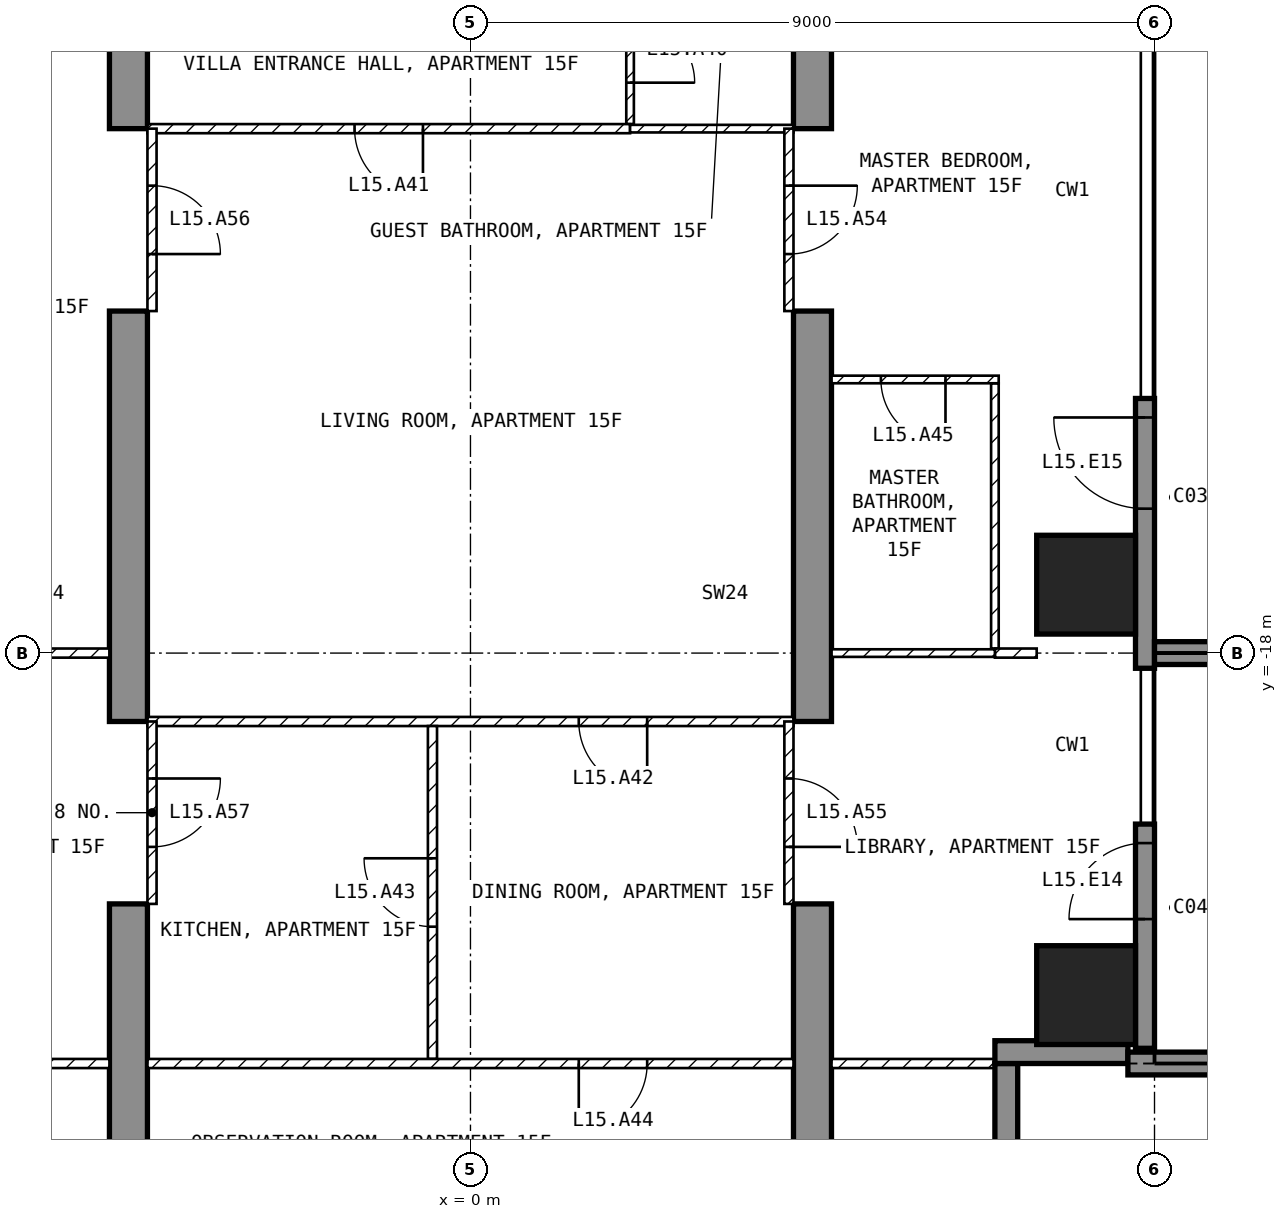
"""IFC4 building model, lengths in metres.
Left out: names, types, materials, properties, quantities, classifications, styles, units other than length and angle.
Written with IfcOpenShell. Run it as: python <this file> out.ifc"""

import sys

from ifc_helpers import new_model, si_unit, direction, frame, frame_2d, origin, origin_2d, place, context, subcontext, project, spatial, polyline, rectangle, outline, extrude, element, fill, save


model = new_model("IFC4")
c1 = context("Model", 3, precision=1e-05, world=origin(), true_north=direction((0.0, 1.0)))
c2 = subcontext(c1, "Body", "Model", "MODEL_VIEW")
j1 = project(units=[si_unit("LENGTHUNIT", "METRE"), si_unit("PLANEANGLEUNIT", "RADIAN")], contexts=[c1])
p1 = place(None, origin())
s1 = spatial("IfcSite", under=j1, at=p1, CompositionType="ELEMENT")
p2 = place(p1, origin())
s2 = spatial("IfcBuilding", under=s1, at=p2, CompositionType="ELEMENT")
p3 = place(p2, frame((0.0, 0.0, 71.5)))
s3 = spatial("IfcBuildingStorey", under=s2, at=p3, CompositionType="ELEMENT", Elevation=71.5)
for number, where, z_axis, x_axis in (
    (1, (8.1, -22.5, -0.25), (0.0, 0.0, 1.0), (1.0, 0.0, 0.0)),
    (2, (8.1, -17.1, -0.25), (0.0, 0.0, 1.0), (1.0, 0.0, 0.0)),
):
    element("IfcColumn", number, at=place(p3, frame(where, z_axis=z_axis, x_axis=x_axis)), inside=s3, PredefinedType="COLUMN", context=c2, shape_type="SweptSolid", body=[
        extrude(rectangle(XDim=1.3, YDim=1.3, at=origin_2d()), origin(), (0.0, 0.0, 1.0), 3.5),
    ])
for number, where, z_axis, x_axis in (
    (3, (-4.75, -25.45, -0.25), (1.0, 0.0, 0.0), (0.0, 1.0, 0.0)),
    (4, (4.25, -25.45, -0.25), (1.0, 0.0, 0.0), (0.0, 1.0, 0.0)),
):
    element("IfcWall", number, at=place(p3, frame(where, z_axis=z_axis, x_axis=x_axis)), inside=s3, PredefinedType="SHEAR", context=c2, shape_type="SweptSolid", body=[
        extrude(outline(polyline([(0.0, 0.0), (4.15, 0.0), (4.15, 2.65), (6.55, 2.65), (6.55, 0.0), (11.95, 0.0), (11.95, 2.65), (14.35, 2.65), (14.35, 0.0), (16.45, 0.0), (16.45, 3.5), (0.0, 3.5), (0.0, 0.0)])), origin(), (0.0, 0.0, 1.0), 0.5),
    ])
p4 = place(p3, frame((8.875, -23.2, 0.0), z_axis=(0.0, 0.0, 1.0), x_axis=(0.0, 1.0, 0.0)))
e5 = element("IfcWall", 5, at=p4, inside=s3, PredefinedType="SOLIDWALL", context=c2, shape_type="SweptSolid", body=[
    extrude(rectangle(XDim=2.95, YDim=0.25, at=frame_2d((1.475, 0.0))), origin(), (0.0, 0.0, 1.0), 3.25),
])
p5 = place(p4, frame((1.7, 0.0, 0.0)))
e6 = element("IfcOpeningElement", 6, at=p5, cuts=e5, PredefinedType="OPENING", context=c2, shape_type="SweptSolid", body=[
    extrude(rectangle(XDim=1.0, YDim=2.4, at=frame_2d((0.5, 1.2))), frame((0.0, 0.135, 0.0), z_axis=(0.0, -1.0, 0.0), x_axis=(1.0, 0.0, 0.0)), (0.0, 0.0, 1.0), 0.27),
])
p6 = place(p3, frame((8.875, -18.2, 0.0), z_axis=(0.0, 0.0, 1.0), x_axis=(0.0, 1.0, 0.0)))
e7 = element("IfcWall", 7, at=p6, inside=s3, PredefinedType="SOLIDWALL", context=c2, shape_type="SweptSolid", body=[
    extrude(rectangle(XDim=3.55, YDim=0.25, at=frame_2d((1.775, 0.0))), origin(), (0.0, 0.0, 1.0), 3.25),
])
p7 = place(p6, frame((2.1, 0.0, 0.0)))
e8 = element("IfcOpeningElement", 8, at=p7, cuts=e7, PredefinedType="OPENING", context=c2, shape_type="SweptSolid", body=[
    extrude(rectangle(XDim=1.2, YDim=2.4, at=frame_2d((0.6, 1.2))), frame((0.0, 0.135, 0.0), z_axis=(0.0, -1.0, 0.0), x_axis=(1.0, 0.0, 0.0)), (0.0, 0.0, 1.0), 0.27),
])
p8 = place(p3, frame((7.05, -25.2, 0.0), z_axis=(0.0, 0.0, 1.0), x_axis=(0.0, 1.0, 0.0)))
e9 = element("IfcWall", 9, at=p8, inside=s3, PredefinedType="SOLIDWALL", context=c2, shape_type="SweptSolid", body=[
    extrude(rectangle(XDim=1.8, YDim=0.3, at=frame_2d((0.9, 0.0))), origin(), (0.0, 0.0, 1.0), 3.25),
])
p9 = place(p3, frame((6.9, -23.25, 0.0), z_axis=(0.0, 0.0, 1.0), x_axis=(1.0, 0.0, 0.0)))
e10 = element("IfcWall", 10, at=p9, inside=s3, PredefinedType="SOLIDWALL", context=c2, shape_type="SweptSolid", body=[
    extrude(rectangle(XDim=1.75, YDim=0.3, at=frame_2d((0.875, 0.0))), origin(), (0.0, 0.0, 1.0), 3.25),
])
p10 = place(p3, frame((8.65, -23.4, 0.0), z_axis=(0.0, 0.0, 1.0), x_axis=(1.0, 0.0, 0.0)))
e11 = element("IfcWall", 11, at=p10, inside=s3, PredefinedType="SOLIDWALL", context=c2, shape_type="SweptSolid", body=[
    extrude(rectangle(XDim=3.05, YDim=0.3, at=frame_2d((1.525, 0.0))), origin(), (0.0, 0.0, 1.0), 3.25),
])
p11 = place(p3, frame((9.0, -18.0, 0.0), z_axis=(0.0, 0.0, 1.0), x_axis=(1.0, 0.0, 0.0)))
e12 = element("IfcWall", 12, at=p11, inside=s3, PredefinedType="SOLIDWALL", context=c2, shape_type="SweptSolid", body=[
    extrude(rectangle(XDim=2.7, YDim=0.3, at=frame_2d((1.35, 0.0))), origin(), (0.0, 0.0, 1.0), 3.25),
])
p12 = place(p3, frame((2.1, -9.1, 0.0), z_axis=(0.0, 0.0, 1.0), x_axis=(0.0, -1.0, 0.0)))
e13 = element("IfcWall", 13, at=p12, inside=s3, PredefinedType="PARTITIONING", context=c2, shape_type="SweptSolid", body=[
    extrude(rectangle(XDim=1.94, YDim=0.1, at=frame_2d((0.97, 0.0))), origin(), (0.0, 0.0, 1.0), 3.25),
])
p13 = place(p12, frame((0.545, 0.0, 0.0)))
e14 = element("IfcOpeningElement", 14, at=p13, cuts=e13, PredefinedType="OPENING", context=c2, shape_type="SweptSolid", body=[
    extrude(rectangle(XDim=0.85, YDim=2.1, at=frame_2d((0.425, 1.05))), frame((0.0, 0.06, 0.0), z_axis=(0.0, -1.0, 0.0), x_axis=(1.0, 0.0, 0.0)), (0.0, 0.0, 1.0), 0.12),
])
p14 = place(p3, frame((2.1, -11.1, 0.0), z_axis=(0.0, 0.0, 1.0), x_axis=(-1.0, 0.0, 0.0)))
e15 = element("IfcWall", 15, at=p14, inside=s3, PredefinedType="PARTITIONING", context=c2, shape_type="SweptSolid", body=[
    extrude(rectangle(XDim=6.35, YDim=0.12, at=frame_2d((3.175, 0.0))), origin(), (0.0, 0.0, 1.0), 3.25),
])
p15 = place(p14, frame((2.725, 0.0, 0.0)))
e16 = element("IfcOpeningElement", 16, at=p15, cuts=e15, PredefinedType="OPENING", context=c2, shape_type="SweptSolid", body=[
    extrude(rectangle(XDim=0.9, YDim=2.1, at=frame_2d((0.45, 1.05))), frame((0.0, 0.07, 0.0), z_axis=(0.0, -1.0, 0.0), x_axis=(1.0, 0.0, 0.0)), (0.0, 0.0, 1.0), 0.14),
])
p16 = place(p3, frame((4.25, -11.1, 0.0), z_axis=(0.0, 0.0, 1.0), x_axis=(-1.0, 0.0, 0.0)))
e17 = element("IfcWall", 17, at=p16, inside=s3, PredefinedType="PARTITIONING", context=c2, shape_type="SweptSolid", body=[
    extrude(rectangle(XDim=2.15, YDim=0.1, at=frame_2d((1.075, 0.0))), origin(), (0.0, 0.0, 1.0), 3.25),
])
p17 = place(p3, frame((4.25, -18.9, 0.0), z_axis=(0.0, 0.0, 1.0), x_axis=(-1.0, 0.0, 0.0)))
e18 = element("IfcWall", 18, at=p17, inside=s3, PredefinedType="PARTITIONING", context=c2, shape_type="SweptSolid", body=[
    extrude(rectangle(XDim=8.5, YDim=0.12, at=frame_2d((4.25, 0.0))), origin(), (0.0, 0.0, 1.0), 3.25),
])
p18 = place(p17, frame((1.925, 0.0, 0.0)))
e19 = element("IfcOpeningElement", 19, at=p18, cuts=e18, PredefinedType="OPENING", context=c2, shape_type="SweptSolid", body=[
    extrude(rectangle(XDim=0.9, YDim=2.1, at=frame_2d((0.45, 1.05))), frame((0.0, 0.07, 0.0), z_axis=(0.0, -1.0, 0.0), x_axis=(1.0, 0.0, 0.0)), (0.0, 0.0, 1.0), 0.14),
])
p19 = place(p3, frame((-0.5, -23.34, 0.0), z_axis=(0.0, 0.0, 1.0), x_axis=(0.0, 1.0, 0.0)))
e20 = element("IfcWall", 20, at=p19, inside=s3, PredefinedType="PARTITIONING", context=c2, shape_type="SweptSolid", body=[
    extrude(rectangle(XDim=4.38, YDim=0.12, at=frame_2d((2.19, 0.0))), origin(), (0.0, 0.0, 1.0), 3.25),
])
p20 = place(p19, frame((1.74, 0.0, 0.0)))
e21 = element("IfcOpeningElement", 21, at=p20, cuts=e20, PredefinedType="OPENING", context=c2, shape_type="SweptSolid", body=[
    extrude(rectangle(XDim=0.9, YDim=2.1, at=frame_2d((0.45, 1.05))), frame((0.0, 0.07, 0.0), z_axis=(0.0, -1.0, 0.0), x_axis=(1.0, 0.0, 0.0)), (0.0, 0.0, 1.0), 0.14),
])
p21 = place(p3, frame((4.25, -23.4, 0.0), z_axis=(0.0, 0.0, 1.0), x_axis=(-1.0, 0.0, 0.0)))
e22 = element("IfcWall", 22, at=p21, inside=s3, PredefinedType="PARTITIONING", context=c2, shape_type="SweptSolid", body=[
    extrude(rectangle(XDim=8.5, YDim=0.12, at=frame_2d((4.25, 0.0))), origin(), (0.0, 0.0, 1.0), 3.25),
])
p22 = place(p21, frame((1.925, 0.0, 0.0)))
e23 = element("IfcOpeningElement", 23, at=p22, cuts=e22, PredefinedType="OPENING", context=c2, shape_type="SweptSolid", body=[
    extrude(rectangle(XDim=0.9, YDim=2.1, at=frame_2d((0.45, 1.05))), frame((0.0, 0.07, 0.0), z_axis=(0.0, -1.0, 0.0), x_axis=(1.0, 0.0, 0.0)), (0.0, 0.0, 1.0), 0.14),
])
p23 = place(p3, frame((6.9, -17.94, 0.0), z_axis=(0.0, 0.0, 1.0), x_axis=(0.0, 1.0, 0.0)))
e24 = element("IfcWall", 24, at=p23, inside=s3, PredefinedType="PARTITIONING", context=c2, shape_type="SweptSolid", body=[
    extrude(rectangle(XDim=3.49, YDim=0.1, at=frame_2d((1.745, 0.0))), origin(), (0.0, 0.0, 1.0), 3.25),
])
p24 = place(p3, frame((6.95, -14.4, 0.0), z_axis=(0.0, 0.0, 1.0), x_axis=(-1.0, 0.0, 0.0)))
e25 = element("IfcWall", 25, at=p24, inside=s3, PredefinedType="PARTITIONING", context=c2, shape_type="SweptSolid", body=[
    extrude(rectangle(XDim=2.2, YDim=0.1, at=frame_2d((1.1, 0.0))), origin(), (0.0, 0.0, 1.0), 3.25),
])
p25 = place(p24, frame((0.7, 0.0, 0.0)))
e26 = element("IfcOpeningElement", 26, at=p25, cuts=e25, PredefinedType="OPENING", context=c2, shape_type="SweptSolid", body=[
    extrude(rectangle(XDim=0.85, YDim=2.1, at=frame_2d((0.425, 1.05))), frame((0.0, 0.06, 0.0), z_axis=(0.0, -1.0, 0.0), x_axis=(1.0, 0.0, 0.0)), (0.0, 0.0, 1.0), 0.12),
])
p26 = place(p3, frame((7.45, -18.0, 0.0), z_axis=(0.0, 0.0, 1.0), x_axis=(-1.0, 0.0, 0.0)))
e27 = element("IfcWall", 27, at=p26, inside=s3, PredefinedType="PARTITIONING", context=c2, shape_type="SweptSolid", body=[
    extrude(rectangle(XDim=0.55, YDim=0.12, at=frame_2d((0.275, 0.0))), origin(), (0.0, 0.0, 1.0), 3.25),
])
p27 = place(p3, frame((6.9, -18.0, 0.0), z_axis=(0.0, 0.0, 1.0), x_axis=(-1.0, 0.0, 0.0)))
e28 = element("IfcWall", 28, at=p27, inside=s3, PredefinedType="PARTITIONING", context=c2, shape_type="SweptSolid", body=[
    extrude(rectangle(XDim=2.15, YDim=0.1, at=frame_2d((1.075, 0.0))), origin(), (0.0, 0.0, 1.0), 3.25),
])
p28 = place(p3, frame((7.12, -23.4, 0.0), z_axis=(0.0, 0.0, 1.0), x_axis=(-1.0, 0.0, 0.0)))
e29 = element("IfcWall", 29, at=p28, inside=s3, PredefinedType="PARTITIONING", context=c2, shape_type="SweptSolid", body=[
    extrude(rectangle(XDim=2.37, YDim=0.12, at=frame_2d((1.185, 0.0))), origin(), (0.0, 0.0, 1.0), 3.25),
])
p29 = place(p3, frame((-4.75, -18.0, 0.0), z_axis=(0.0, 0.0, 1.0), x_axis=(-1.0, 0.0, 0.0)))
e30 = element("IfcWall", 30, at=p29, inside=s3, PredefinedType="PARTITIONING", context=c2, shape_type="SweptSolid", body=[
    extrude(rectangle(XDim=2.7, YDim=0.12, at=frame_2d((1.35, 0.0))), origin(), (0.0, 0.0, 1.0), 3.25),
])
p30 = place(p3, frame((-4.75, -23.4, 0.0), z_axis=(0.0, 0.0, 1.0), x_axis=(-1.0, 0.0, 0.0)))
e31 = element("IfcWall", 31, at=p30, inside=s3, PredefinedType="PARTITIONING", context=c2, shape_type="SweptSolid", body=[
    extrude(rectangle(XDim=2.37, YDim=0.12, at=frame_2d((1.185, 0.0))), origin(), (0.0, 0.0, 1.0), 3.25),
])
p31 = place(p3, frame((4.19, -11.1, 0.0), z_axis=(0.0, 0.0, 1.0), x_axis=(0.0, -1.0, 0.0)))
e32 = element("IfcWall", 32, at=p31, inside=s3, PredefinedType="PARTITIONING", context=c2, shape_type="SweptSolid", body=[
    extrude(rectangle(XDim=2.4, YDim=0.12, at=frame_2d((1.2, 0.0))), origin(), (0.0, 0.0, 1.0), 2.4),
])
p32 = place(p31, frame((0.75, 0.0, 0.0)))
e33 = element("IfcOpeningElement", 33, at=p32, cuts=e32, PredefinedType="OPENING", context=c2, shape_type="SweptSolid", body=[
    extrude(rectangle(XDim=0.9, YDim=2.1, at=frame_2d((0.45, 1.05))), frame((0.0, 0.07, 0.0), z_axis=(0.0, -1.0, 0.0), x_axis=(1.0, 0.0, 0.0)), (0.0, 0.0, 1.0), 0.14),
])
p33 = place(p3, frame((4.19, -18.9, 0.0), z_axis=(0.0, 0.0, 1.0), x_axis=(0.0, -1.0, 0.0)))
e34 = element("IfcWall", 34, at=p33, inside=s3, PredefinedType="PARTITIONING", context=c2, shape_type="SweptSolid", body=[
    extrude(rectangle(XDim=2.4, YDim=0.12, at=frame_2d((1.2, 0.0))), origin(), (0.0, 0.0, 1.0), 2.4),
])
p34 = place(p33, frame((0.75, 0.0, 0.0)))
e35 = element("IfcOpeningElement", 35, at=p34, cuts=e34, PredefinedType="OPENING", context=c2, shape_type="SweptSolid", body=[
    extrude(rectangle(XDim=0.9, YDim=2.1, at=frame_2d((0.45, 1.05))), frame((0.0, 0.07, 0.0), z_axis=(0.0, -1.0, 0.0), x_axis=(1.0, 0.0, 0.0)), (0.0, 0.0, 1.0), 0.14),
])
p35 = place(p3, frame((-4.19, -11.1, 0.0), z_axis=(0.0, 0.0, 1.0), x_axis=(0.0, -1.0, 0.0)))
e36 = element("IfcWall", 36, at=p35, inside=s3, PredefinedType="PARTITIONING", context=c2, shape_type="SweptSolid", body=[
    extrude(rectangle(XDim=2.4, YDim=0.12, at=frame_2d((1.2, 0.0))), origin(), (0.0, 0.0, 1.0), 2.4),
])
p36 = place(p35, frame((0.75, 0.0, 0.0)))
e37 = element("IfcOpeningElement", 37, at=p36, cuts=e36, PredefinedType="OPENING", context=c2, shape_type="SweptSolid", body=[
    extrude(rectangle(XDim=0.9, YDim=2.1, at=frame_2d((0.45, 1.05))), frame((0.0, 0.07, 0.0), z_axis=(0.0, -1.0, 0.0), x_axis=(1.0, 0.0, 0.0)), (0.0, 0.0, 1.0), 0.14),
])
p37 = place(p3, frame((-4.19, -18.9, 0.0), z_axis=(0.0, 0.0, 1.0), x_axis=(0.0, -1.0, 0.0)))
e38 = element("IfcWall", 38, at=p37, inside=s3, PredefinedType="PARTITIONING", context=c2, shape_type="SweptSolid", body=[
    extrude(rectangle(XDim=2.4, YDim=0.12, at=frame_2d((1.2, 0.0))), origin(), (0.0, 0.0, 1.0), 2.4),
])
p38 = place(p37, frame((0.75, 0.0, 0.0)))
e39 = element("IfcOpeningElement", 39, at=p38, cuts=e38, PredefinedType="OPENING", context=c2, shape_type="SweptSolid", body=[
    extrude(rectangle(XDim=0.9, YDim=2.1, at=frame_2d((0.45, 1.05))), frame((0.0, 0.07, 0.0), z_axis=(0.0, -1.0, 0.0), x_axis=(1.0, 0.0, 0.0)), (0.0, 0.0, 1.0), 0.14),
])
p39 = place(p5, origin())
e40 = element("IfcDoor", 40, at=p39, inside=s3, OperationType="SINGLE_SWING_LEFT", PredefinedType="DOOR", context=c2, shape_type="SweptSolid", body=[
    extrude(rectangle(XDim=1.0, YDim=2.4, at=frame_2d((0.5, 1.2))), frame((0.0, 0.025, 0.0), z_axis=(0.0, -1.0, 0.0), x_axis=(1.0, 0.0, 0.0)), (0.0, 0.0, 1.0), 0.05),
])
fill(e6, e40)
p40 = place(p7, origin())
e41 = element("IfcDoor", 41, at=p40, inside=s3, OperationType="SINGLE_SWING_RIGHT", PredefinedType="DOOR", context=c2, shape_type="SweptSolid", body=[
    extrude(rectangle(XDim=1.2, YDim=2.4, at=frame_2d((0.6, 1.2))), frame((0.0, 0.025, 0.0), z_axis=(0.0, -1.0, 0.0), x_axis=(1.0, 0.0, 0.0)), (0.0, 0.0, 1.0), 0.05),
])
fill(e8, e41)
p41 = place(p13, origin())
e42 = element("IfcDoor", 42, at=p41, inside=s3, OperationType="SINGLE_SWING_RIGHT", PredefinedType="DOOR", context=c2, shape_type="SweptSolid", body=[
    extrude(rectangle(XDim=0.85, YDim=2.1, at=frame_2d((0.425, 1.05))), frame((0.0, 0.025, 0.0), z_axis=(0.0, -1.0, 0.0), x_axis=(1.0, 0.0, 0.0)), (0.0, 0.0, 1.0), 0.05),
])
fill(e14, e42)
p42 = place(p15, origin())
e43 = element("IfcDoor", 43, at=p42, inside=s3, OperationType="SINGLE_SWING_LEFT", PredefinedType="DOOR", context=c2, shape_type="SweptSolid", body=[
    extrude(rectangle(XDim=0.9, YDim=2.1, at=frame_2d((0.45, 1.05))), frame((0.0, 0.025, 0.0), z_axis=(0.0, -1.0, 0.0), x_axis=(1.0, 0.0, 0.0)), (0.0, 0.0, 1.0), 0.05),
])
fill(e16, e43)
p43 = place(p18, origin())
e44 = element("IfcDoor", 44, at=p43, inside=s3, OperationType="SINGLE_SWING_LEFT", PredefinedType="DOOR", context=c2, shape_type="SweptSolid", body=[
    extrude(rectangle(XDim=0.9, YDim=2.1, at=frame_2d((0.45, 1.05))), frame((0.0, 0.025, 0.0), z_axis=(0.0, -1.0, 0.0), x_axis=(1.0, 0.0, 0.0)), (0.0, 0.0, 1.0), 0.05),
])
fill(e19, e44)
p44 = place(p20, origin())
e45 = element("IfcDoor", 45, at=p44, inside=s3, OperationType="SINGLE_SWING_RIGHT", PredefinedType="DOOR", context=c2, shape_type="SweptSolid", body=[
    extrude(rectangle(XDim=0.9, YDim=2.1, at=frame_2d((0.45, 1.05))), frame((0.0, 0.025, 0.0), z_axis=(0.0, -1.0, 0.0), x_axis=(1.0, 0.0, 0.0)), (0.0, 0.0, 1.0), 0.05),
])
fill(e21, e45)
p45 = place(p22, origin())
e46 = element("IfcDoor", 46, at=p45, inside=s3, OperationType="SINGLE_SWING_RIGHT", PredefinedType="DOOR", context=c2, shape_type="SweptSolid", body=[
    extrude(rectangle(XDim=0.9, YDim=2.1, at=frame_2d((0.45, 1.05))), frame((0.0, 0.025, 0.0), z_axis=(0.0, -1.0, 0.0), x_axis=(1.0, 0.0, 0.0)), (0.0, 0.0, 1.0), 0.05),
])
fill(e23, e46)
p46 = place(p25, origin())
e47 = element("IfcDoor", 47, at=p46, inside=s3, OperationType="SINGLE_SWING_LEFT", PredefinedType="DOOR", context=c2, shape_type="SweptSolid", body=[
    extrude(rectangle(XDim=0.85, YDim=2.1, at=frame_2d((0.425, 1.05))), frame((0.0, 0.025, 0.0), z_axis=(0.0, -1.0, 0.0), x_axis=(1.0, 0.0, 0.0)), (0.0, 0.0, 1.0), 0.05),
])
fill(e26, e47)
p47 = place(p32, origin())
e48 = element("IfcDoor", 48, at=p47, inside=s3, OperationType="SINGLE_SWING_LEFT", PredefinedType="DOOR", context=c2, shape_type="SweptSolid", body=[
    extrude(rectangle(XDim=0.9, YDim=2.1, at=frame_2d((0.45, 1.05))), frame((0.0, 0.025, 0.0), z_axis=(0.0, -1.0, 0.0), x_axis=(1.0, 0.0, 0.0)), (0.0, 0.0, 1.0), 0.05),
])
fill(e33, e48)
p48 = place(p34, origin())
e49 = element("IfcDoor", 49, at=p48, inside=s3, OperationType="SINGLE_SWING_RIGHT", PredefinedType="DOOR", context=c2, shape_type="SweptSolid", body=[
    extrude(rectangle(XDim=0.9, YDim=2.1, at=frame_2d((0.45, 1.05))), frame((0.0, 0.025, 0.0), z_axis=(0.0, -1.0, 0.0), x_axis=(1.0, 0.0, 0.0)), (0.0, 0.0, 1.0), 0.05),
])
fill(e35, e49)
p49 = place(p36, origin())
e50 = element("IfcDoor", 50, at=p49, inside=s3, OperationType="SINGLE_SWING_RIGHT", PredefinedType="DOOR", context=c2, shape_type="SweptSolid", body=[
    extrude(rectangle(XDim=0.9, YDim=2.1, at=frame_2d((0.45, 1.05))), frame((0.0, 0.025, 0.0), z_axis=(0.0, -1.0, 0.0), x_axis=(1.0, 0.0, 0.0)), (0.0, 0.0, 1.0), 0.05),
])
fill(e37, e50)
p50 = place(p38, origin())
e51 = element("IfcDoor", 51, at=p50, inside=s3, OperationType="SINGLE_SWING_LEFT", PredefinedType="DOOR", context=c2, shape_type="SweptSolid", body=[
    extrude(rectangle(XDim=0.9, YDim=2.1, at=frame_2d((0.45, 1.05))), frame((0.0, 0.025, 0.0), z_axis=(0.0, -1.0, 0.0), x_axis=(1.0, 0.0, 0.0)), (0.0, 0.0, 1.0), 0.05),
])
fill(e39, e51)
save(model, sys.argv[1])
